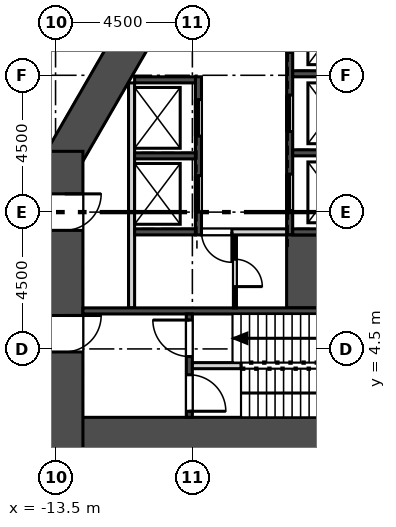
"""IFC4 building model, lengths in metres.
Left out: names, types, materials, properties, quantities, classifications, styles, units other than length and angle.
Written with IfcOpenShell. Run it as: python <this file> out.ifc"""

import sys

from ifc_helpers import new_model, si_unit, direction, frame, frame_2d, origin, place, context, subcontext, project, spatial, rectangle, extrude, element, fill, save


model = new_model("IFC4")
c1 = context("Model", 3, precision=1e-05, world=origin(), true_north=direction((0.0, 1.0)))
c2 = subcontext(c1, "Body", "Model", "MODEL_VIEW")
j1 = project(units=[si_unit("LENGTHUNIT", "METRE"), si_unit("PLANEANGLEUNIT", "RADIAN")], contexts=[c1])
p1 = place(None, origin())
s1 = spatial("IfcSite", under=j1, at=p1, CompositionType="ELEMENT")
p2 = place(p1, origin())
s2 = spatial("IfcBuilding", under=s1, at=p2, CompositionType="ELEMENT")
p3 = place(p2, frame((0.0, 0.0, 132.1)))
s3 = spatial("IfcBuildingStorey", under=s2, at=p3, CompositionType="ELEMENT", Elevation=132.1)
p4 = place(p3, frame((-13.8, 1.65, 0.0), z_axis=(0.0, 0.0, 1.0), x_axis=(1.0, 0.0, 0.0)))
e1 = element("IfcWall", 1, at=p4, inside=s3, PredefinedType="SHEAR", context=c2, shape_type="SweptSolid", body=[
    extrude(rectangle(XDim=27.6, YDim=1.2, at=frame_2d((13.8, 0.0))), origin(), (0.0, 0.0, 1.0), 5.4),
])
p5 = place(p3, frame((-8.777, 18.5, 0.0), z_axis=(0.0, 0.0, 1.0), x_axis=(-0.499998513025, -0.866026262288, 0.0)))
e2 = element("IfcWall", 2, at=p5, inside=s3, PredefinedType="SHEAR", context=c2, shape_type="SweptSolid", body=[
    extrude(rectangle(XDim=9.008, YDim=1.2, at=frame_2d((4.504, 0.0))), origin(), (0.0, 0.0, 1.0), 5.4),
])
p6 = place(p3, frame((-13.2, 10.999, 0.0), z_axis=(0.0, 0.0, 1.0), x_axis=(0.0, -1.0, 0.0)))
e3 = element("IfcWall", 3, at=p6, inside=s3, PredefinedType="SHEAR", context=c2, shape_type="SweptSolid", body=[
    extrude(rectangle(XDim=9.949, YDim=1.2, at=frame_2d((4.975, 0.0))), origin(), (0.0, 0.0, 1.0), 5.4),
])
p7 = place(p6, frame((5.399, 0.0, 0.0)))
e4 = element("IfcOpeningElement", 4, at=p7, cuts=e3, PredefinedType="OPENING", context=c2, shape_type="SweptSolid", body=[
    extrude(rectangle(XDim=1.2, YDim=2.1, at=frame_2d((0.6, 1.05))), frame((0.0, 0.61, 0.0), z_axis=(0.0, -1.0, 0.0), x_axis=(1.0, 0.0, 0.0)), (0.0, 0.0, 1.0), 1.22),
])
p8 = place(p6, frame((1.399, 0.0, 0.0)))
e5 = element("IfcOpeningElement", 5, at=p8, cuts=e3, PredefinedType="OPENING", context=c2, shape_type="SweptSolid", body=[
    extrude(rectangle(XDim=1.2, YDim=2.1, at=frame_2d((0.6, 1.05))), frame((0.0, 0.61, 0.0), z_axis=(0.0, -1.0, 0.0), x_axis=(1.0, 0.0, 0.0)), (0.0, 0.0, 1.0), 1.22),
])
p9 = place(p3, frame((-4.353, 51.692, 0.0), z_axis=(0.0, 0.0, 1.0), x_axis=(-0.500000700546, -0.866024999324, 0.0)))
e6 = element("IfcWall", 6, at=p9, inside=s3, PredefinedType="SOLIDWALL", context=c2, shape_type="SweptSolid", body=[
    extrude(rectangle(XDim=50.787, YDim=0.34, at=frame_2d((25.393, 0.0))), origin(), (0.0, 0.0, 1.0), 5.0),
])
p10 = place(p9, frame((3.59, 0.0, 0.9)))
e7 = element("IfcOpeningElement", 7, at=p10, cuts=e6, PredefinedType="OPENING", context=c2, shape_type="SweptSolid", body=[
    extrude(rectangle(XDim=1.885, YDim=3.0, at=frame_2d((0.942, 1.5))), frame((0.0, 0.18, 0.0), z_axis=(0.0, -1.0, 0.0), x_axis=(1.0, 0.0, 0.0)), (0.0, 0.0, 1.0), 0.36),
])
p11 = place(p9, frame((6.59, 0.0, 0.9)))
e8 = element("IfcOpeningElement", 8, at=p11, cuts=e6, PredefinedType="OPENING", context=c2, shape_type="SweptSolid", body=[
    extrude(rectangle(XDim=1.885, YDim=3.0, at=frame_2d((0.942, 1.5))), frame((0.0, 0.18, 0.0), z_axis=(0.0, -1.0, 0.0), x_axis=(1.0, 0.0, 0.0)), (0.0, 0.0, 1.0), 0.36),
])
p12 = place(p9, frame((9.59, 0.0, 0.9)))
e9 = element("IfcOpeningElement", 9, at=p12, cuts=e6, PredefinedType="OPENING", context=c2, shape_type="SweptSolid", body=[
    extrude(rectangle(XDim=1.885, YDim=3.0, at=frame_2d((0.942, 1.5))), frame((0.0, 0.18, 0.0), z_axis=(0.0, -1.0, 0.0), x_axis=(1.0, 0.0, 0.0)), (0.0, 0.0, 1.0), 0.36),
])
p13 = place(p9, frame((12.59, 0.0, 0.9)))
e10 = element("IfcOpeningElement", 10, at=p13, cuts=e6, PredefinedType="OPENING", context=c2, shape_type="SweptSolid", body=[
    extrude(rectangle(XDim=1.885, YDim=3.0, at=frame_2d((0.942, 1.5))), frame((0.0, 0.18, 0.0), z_axis=(0.0, -1.0, 0.0), x_axis=(1.0, 0.0, 0.0)), (0.0, 0.0, 1.0), 0.36),
])
p14 = place(p9, frame((15.59, 0.0, 0.9)))
e11 = element("IfcOpeningElement", 11, at=p14, cuts=e6, PredefinedType="OPENING", context=c2, shape_type="SweptSolid", body=[
    extrude(rectangle(XDim=1.885, YDim=3.0, at=frame_2d((0.942, 1.5))), frame((0.0, 0.18, 0.0), z_axis=(0.0, -1.0, 0.0), x_axis=(1.0, 0.0, 0.0)), (0.0, 0.0, 1.0), 0.36),
])
p15 = place(p9, frame((18.59, 0.0, 0.9)))
e12 = element("IfcOpeningElement", 12, at=p15, cuts=e6, PredefinedType="OPENING", context=c2, shape_type="SweptSolid", body=[
    extrude(rectangle(XDim=1.885, YDim=3.0, at=frame_2d((0.942, 1.5))), frame((0.0, 0.18, 0.0), z_axis=(0.0, -1.0, 0.0), x_axis=(1.0, 0.0, 0.0)), (0.0, 0.0, 1.0), 0.36),
])
p16 = place(p9, frame((21.59, 0.0, 0.9)))
e13 = element("IfcOpeningElement", 13, at=p16, cuts=e6, PredefinedType="OPENING", context=c2, shape_type="SweptSolid", body=[
    extrude(rectangle(XDim=1.885, YDim=3.0, at=frame_2d((0.942, 1.5))), frame((0.0, 0.18, 0.0), z_axis=(0.0, -1.0, 0.0), x_axis=(1.0, 0.0, 0.0)), (0.0, 0.0, 1.0), 0.36),
])
p17 = place(p9, frame((24.59, 0.0, 0.9)))
e14 = element("IfcOpeningElement", 14, at=p17, cuts=e6, PredefinedType="OPENING", context=c2, shape_type="SweptSolid", body=[
    extrude(rectangle(XDim=1.885, YDim=3.0, at=frame_2d((0.942, 1.5))), frame((0.0, 0.18, 0.0), z_axis=(0.0, -1.0, 0.0), x_axis=(1.0, 0.0, 0.0)), (0.0, 0.0, 1.0), 0.36),
])
p18 = place(p9, frame((27.59, 0.0, 0.9)))
e15 = element("IfcOpeningElement", 15, at=p18, cuts=e6, PredefinedType="OPENING", context=c2, shape_type="SweptSolid", body=[
    extrude(rectangle(XDim=1.885, YDim=3.0, at=frame_2d((0.942, 1.5))), frame((0.0, 0.18, 0.0), z_axis=(0.0, -1.0, 0.0), x_axis=(1.0, 0.0, 0.0)), (0.0, 0.0, 1.0), 0.36),
])
p19 = place(p9, frame((30.59, 0.0, 0.9)))
e16 = element("IfcOpeningElement", 16, at=p19, cuts=e6, PredefinedType="OPENING", context=c2, shape_type="SweptSolid", body=[
    extrude(rectangle(XDim=1.885, YDim=3.0, at=frame_2d((0.942, 1.5))), frame((0.0, 0.18, 0.0), z_axis=(0.0, -1.0, 0.0), x_axis=(1.0, 0.0, 0.0)), (0.0, 0.0, 1.0), 0.36),
])
p20 = place(p9, frame((33.59, 0.0, 0.9)))
e17 = element("IfcOpeningElement", 17, at=p20, cuts=e6, PredefinedType="OPENING", context=c2, shape_type="SweptSolid", body=[
    extrude(rectangle(XDim=1.885, YDim=3.0, at=frame_2d((0.942, 1.5))), frame((0.0, 0.18, 0.0), z_axis=(0.0, -1.0, 0.0), x_axis=(1.0, 0.0, 0.0)), (0.0, 0.0, 1.0), 0.36),
])
p21 = place(p9, frame((36.59, 0.0, 0.9)))
e18 = element("IfcOpeningElement", 18, at=p21, cuts=e6, PredefinedType="OPENING", context=c2, shape_type="SweptSolid", body=[
    extrude(rectangle(XDim=1.885, YDim=3.0, at=frame_2d((0.942, 1.5))), frame((0.0, 0.18, 0.0), z_axis=(0.0, -1.0, 0.0), x_axis=(1.0, 0.0, 0.0)), (0.0, 0.0, 1.0), 0.36),
])
p22 = place(p9, frame((39.59, 0.0, 0.9)))
e19 = element("IfcOpeningElement", 19, at=p22, cuts=e6, PredefinedType="OPENING", context=c2, shape_type="SweptSolid", body=[
    extrude(rectangle(XDim=1.885, YDim=3.0, at=frame_2d((0.942, 1.5))), frame((0.0, 0.18, 0.0), z_axis=(0.0, -1.0, 0.0), x_axis=(1.0, 0.0, 0.0)), (0.0, 0.0, 1.0), 0.36),
])
p23 = place(p9, frame((42.59, 0.0, 0.9)))
e20 = element("IfcOpeningElement", 20, at=p23, cuts=e6, PredefinedType="OPENING", context=c2, shape_type="SweptSolid", body=[
    extrude(rectangle(XDim=1.885, YDim=3.0, at=frame_2d((0.942, 1.5))), frame((0.0, 0.18, 0.0), z_axis=(0.0, -1.0, 0.0), x_axis=(1.0, 0.0, 0.0)), (0.0, 0.0, 1.0), 0.36),
])
p24 = place(p9, frame((45.59, 0.0, 0.9)))
e21 = element("IfcOpeningElement", 21, at=p24, cuts=e6, PredefinedType="OPENING", context=c2, shape_type="SweptSolid", body=[
    extrude(rectangle(XDim=1.885, YDim=3.0, at=frame_2d((0.942, 1.5))), frame((0.0, 0.18, 0.0), z_axis=(0.0, -1.0, 0.0), x_axis=(1.0, 0.0, 0.0)), (0.0, 0.0, 1.0), 0.36),
])
p25 = place(p3, frame((-11.0, 5.85, 0.0), z_axis=(0.0, 0.0, 1.0), x_axis=(0.0, 1.0, 0.0)))
e22 = element("IfcWall", 22, at=p25, inside=s3, PredefinedType="SOLIDWALL", context=c2, shape_type="SweptSolid", body=[
    extrude(rectangle(XDim=7.4, YDim=0.2, at=frame_2d((3.7, 0.0))), origin(), (0.0, 0.0, 1.0), 5.0),
])
p26 = place(p3, frame((-8.8, 8.25, -0.4), z_axis=(0.0, 0.0, 1.0), x_axis=(0.0, 1.0, 0.0)))
e23 = element("IfcWall", 23, at=p26, inside=s3, PredefinedType="SOLIDWALL", context=c2, shape_type="SweptSolid", body=[
    extrude(rectangle(XDim=5.2, YDim=0.2, at=frame_2d((2.6, 0.0))), origin(), (0.0, 0.0, 1.0), 5.4),
])
p27 = place(p26, frame((0.75, 0.0, 0.4)))
e24 = element("IfcOpeningElement", 24, at=p27, cuts=e23, PredefinedType="OPENING", context=c2, shape_type="SweptSolid", body=[
    extrude(rectangle(XDim=1.2, YDim=2.1, at=frame_2d((0.6, 1.05))), frame((0.0, 0.11, 0.0), z_axis=(0.0, -1.0, 0.0), x_axis=(1.0, 0.0, 0.0)), (0.0, 0.0, 1.0), 0.22),
])
p28 = place(p26, frame((3.25, 0.0, 0.4)))
e25 = element("IfcOpeningElement", 25, at=p28, cuts=e23, PredefinedType="OPENING", context=c2, shape_type="SweptSolid", body=[
    extrude(rectangle(XDim=1.2, YDim=2.1, at=frame_2d((0.6, 1.05))), frame((0.0, 0.11, 0.0), z_axis=(0.0, -1.0, 0.0), x_axis=(1.0, 0.0, 0.0)), (0.0, 0.0, 1.0), 0.22),
])
p29 = place(p3, frame((-5.8, 8.25, -0.4), z_axis=(0.0, 0.0, 1.0), x_axis=(0.0, 1.0, 0.0)))
e26 = element("IfcWall", 26, at=p29, inside=s3, PredefinedType="SOLIDWALL", context=c2, shape_type="SweptSolid", body=[
    extrude(rectangle(XDim=8.0, YDim=0.2, at=frame_2d((4.0, 0.0))), origin(), (0.0, 0.0, 1.0), 5.4),
])
p30 = place(p29, frame((0.8, 0.0, 0.4)))
e27 = element("IfcOpeningElement", 27, at=p30, cuts=e26, PredefinedType="OPENING", context=c2, shape_type="SweptSolid", body=[
    extrude(rectangle(XDim=1.2, YDim=2.1, at=frame_2d((0.6, 1.05))), frame((0.0, 0.11, 0.0), z_axis=(0.0, -1.0, 0.0), x_axis=(1.0, 0.0, 0.0)), (0.0, 0.0, 1.0), 0.22),
])
p31 = place(p29, frame((3.4, 0.0, 0.4)))
e28 = element("IfcOpeningElement", 28, at=p31, cuts=e26, PredefinedType="OPENING", context=c2, shape_type="SweptSolid", body=[
    extrude(rectangle(XDim=1.2, YDim=2.1, at=frame_2d((0.6, 1.05))), frame((0.0, 0.11, 0.0), z_axis=(0.0, -1.0, 0.0), x_axis=(1.0, 0.0, 0.0)), (0.0, 0.0, 1.0), 0.22),
])
p32 = place(p29, frame((6.0, 0.0, 0.4)))
e29 = element("IfcOpeningElement", 29, at=p32, cuts=e26, PredefinedType="OPENING", context=c2, shape_type="SweptSolid", body=[
    extrude(rectangle(XDim=1.2, YDim=2.1, at=frame_2d((0.6, 1.05))), frame((0.0, 0.11, 0.0), z_axis=(0.0, -1.0, 0.0), x_axis=(1.0, 0.0, 0.0)), (0.0, 0.0, 1.0), 0.22),
])
p33 = place(p3, frame((-5.2, 5.85, -0.4), z_axis=(0.0, 0.0, 1.0), x_axis=(0.0, 1.0, 0.0)))
e30 = element("IfcWall", 30, at=p33, inside=s3, PredefinedType="SOLIDWALL", context=c2, shape_type="SweptSolid", body=[
    extrude(rectangle(XDim=2.4, YDim=1.4, at=frame_2d((1.2, 0.0))), origin(), (0.0, 0.0, 1.0), 5.4),
])
p34 = place(p3, frame((-10.9, 8.35, -0.4), z_axis=(0.0, 0.0, 1.0), x_axis=(1.0, 0.0, 0.0)))
e31 = element("IfcWall", 31, at=p34, inside=s3, PredefinedType="SOLIDWALL", context=c2, shape_type="SweptSolid", body=[
    extrude(rectangle(XDim=2.0, YDim=0.2, at=frame_2d((1.0, 0.0))), origin(), (0.0, 0.0, 1.0), 5.4),
])
p35 = place(p3, frame((-5.7, 8.35, -0.4), z_axis=(0.0, 0.0, 1.0), x_axis=(1.0, 0.0, 0.0)))
e32 = element("IfcWall", 32, at=p35, inside=s3, PredefinedType="SOLIDWALL", context=c2, shape_type="SweptSolid", body=[
    extrude(rectangle(XDim=4.2, YDim=0.2, at=frame_2d((2.1, 0.0))), origin(), (0.0, 0.0, 1.0), 5.4),
])
p36 = place(p3, frame((-12.6, 5.75, -0.4), z_axis=(0.0, 0.0, 1.0), x_axis=(1.0, 0.0, 0.0)))
e33 = element("IfcWall", 33, at=p36, inside=s3, PredefinedType="SOLIDWALL", context=c2, shape_type="SweptSolid", body=[
    extrude(rectangle(XDim=11.4, YDim=0.2, at=frame_2d((5.7, 0.0))), origin(), (0.0, 0.0, 1.0), 5.4),
])
p37 = place(p3, frame((-9.1, 2.25, -0.4), z_axis=(0.0, 0.0, 1.0), x_axis=(0.0, 1.0, 0.0)))
e34 = element("IfcWall", 34, at=p37, inside=s3, PredefinedType="SOLIDWALL", context=c2, shape_type="SweptSolid", body=[
    extrude(rectangle(XDim=3.4, YDim=0.2, at=frame_2d((1.7, 0.0))), origin(), (0.0, 0.0, 1.0), 5.4),
])
p38 = place(p37, frame((0.2, 0.0, 0.4)))
e35 = element("IfcOpeningElement", 35, at=p38, cuts=e34, PredefinedType="OPENING", context=c2, shape_type="SweptSolid", body=[
    extrude(rectangle(XDim=1.2, YDim=2.1, at=frame_2d((0.6, 1.05))), frame((0.0, 0.11, 0.0), z_axis=(0.0, -1.0, 0.0), x_axis=(1.0, 0.0, 0.0)), (0.0, 0.0, 1.0), 0.22),
])
p39 = place(p37, frame((2.0, 0.0, 0.4)))
e36 = element("IfcOpeningElement", 36, at=p39, cuts=e34, PredefinedType="OPENING", context=c2, shape_type="SweptSolid", body=[
    extrude(rectangle(XDim=1.2, YDim=2.1, at=frame_2d((0.6, 1.05))), frame((0.0, 0.11, 0.0), z_axis=(0.0, -1.0, 0.0), x_axis=(1.0, 0.0, 0.0)), (0.0, 0.0, 1.0), 0.22),
])
for number, where, z_axis, x_axis in (
    (37, (-10.9, 10.85, -0.4), (0.0, 0.0, 1.0), (1.0, 0.0, 0.0)),
    (38, (-10.9, 13.35, -0.4), (0.0, 0.0, 1.0), (1.0, 0.0, 0.0)),
    (39, (-5.7, 10.95, -0.4), (0.0, 0.0, 1.0), (1.0, 0.0, 0.0)),
    (40, (-5.7, 13.55, -0.4), (0.0, 0.0, 1.0), (1.0, 0.0, 0.0)),
):
    element("IfcWall", number, at=place(p3, frame(where, z_axis=z_axis, x_axis=x_axis)), inside=s3, PredefinedType="SOLIDWALL", context=c2, shape_type="SweptSolid", body=[
        extrude(rectangle(XDim=2.0, YDim=0.2, at=frame_2d((1.0, 0.0))), origin(), (0.0, 0.0, 1.0), 5.4),
    ])
p40 = place(p3, frame((-7.6, 5.85, 0.0), z_axis=(0.0, 0.0, 1.0), x_axis=(0.0, 1.0, 0.0)))
e41 = element("IfcWall", 41, at=p40, inside=s3, PredefinedType="PARTITIONING", context=c2, shape_type="SweptSolid", body=[
    extrude(rectangle(XDim=2.4, YDim=0.1, at=frame_2d((1.2, 0.0))), origin(), (0.0, 0.0, 1.0), 5.0),
])
p41 = place(p40, frame((0.7, 0.0, 0.0)))
e42 = element("IfcOpeningElement", 42, at=p41, cuts=e41, PredefinedType="OPENING", context=c2, shape_type="SweptSolid", body=[
    extrude(rectangle(XDim=0.9, YDim=2.1, at=frame_2d((0.45, 1.05))), frame((0.0, 0.06, 0.0), z_axis=(0.0, -1.0, 0.0), x_axis=(1.0, 0.0, 0.0)), (0.0, 0.0, 1.0), 0.12),
])
p42 = place(p3, frame((-8.7, 8.35, 0.0), z_axis=(0.0, 0.0, 1.0), x_axis=(1.0, 0.0, 0.0)))
e43 = element("IfcWall", 43, at=p42, inside=s3, PredefinedType="SOLIDWALL", context=c2, shape_type="SweptSolid", body=[
    extrude(rectangle(XDim=2.8, YDim=0.2, at=frame_2d((1.4, 0.0))), origin(), (0.0, 0.0, 1.0), 5.0),
])
p43 = place(p42, origin())
e44 = element("IfcOpeningElement", 44, at=p43, cuts=e43, PredefinedType="OPENING", context=c2, shape_type="SweptSolid", body=[
    extrude(rectangle(XDim=1.0, YDim=2.1, at=frame_2d((0.5, 1.05))), frame((0.0, 0.11, 0.0), z_axis=(0.0, -1.0, 0.0), x_axis=(1.0, 0.0, 0.0)), (0.0, 0.0, 1.0), 0.22),
])
p44 = place(p3, frame((-9.0, 3.95, 0.0), z_axis=(0.0, 0.0, 1.0), x_axis=(1.0, 0.0, 0.0)))
e45 = element("IfcWall", 45, at=p44, inside=s3, PredefinedType="SOLIDWALL", context=c2, shape_type="SweptSolid", body=[
    extrude(rectangle(XDim=1.6, YDim=0.2, at=frame_2d((0.8, 0.0))), origin(), (0.0, 0.0, 1.0), 5.0),
])
p45 = place(p3, frame((-17.626, 12.272, 0.0), z_axis=(0.0, 0.0, 1.0), x_axis=(0.500008476462, 0.866020509841, 0.0)))
e46 = element("IfcWall", 46, at=p45, inside=s3, PredefinedType="SOLIDWALL", context=c2, shape_type="SweptSolid", body=[
    extrude(rectangle(XDim=11.896, YDim=0.3, at=frame_2d((5.948, 0.0))), origin(), (0.0, 0.0, 1.0), 5.0),
])
p46 = place(p27, origin())
e47 = element("IfcDoor", 47, at=p46, inside=s3, OperationType="SLIDING_TO_LEFT", PredefinedType="DOOR", context=c2, shape_type="SweptSolid", body=[
    extrude(rectangle(XDim=1.2, YDim=2.1, at=frame_2d((0.6, 1.05))), frame((0.0, 0.025, 0.0), z_axis=(0.0, -1.0, 0.0), x_axis=(1.0, 0.0, 0.0)), (0.0, 0.0, 1.0), 0.05),
])
fill(e24, e47)
p47 = place(p28, origin())
e48 = element("IfcDoor", 48, at=p47, inside=s3, OperationType="SLIDING_TO_LEFT", PredefinedType="DOOR", context=c2, shape_type="SweptSolid", body=[
    extrude(rectangle(XDim=1.2, YDim=2.1, at=frame_2d((0.6, 1.05))), frame((0.0, 0.025, 0.0), z_axis=(0.0, -1.0, 0.0), x_axis=(1.0, 0.0, 0.0)), (0.0, 0.0, 1.0), 0.05),
])
fill(e25, e48)
p48 = place(p30, origin())
e49 = element("IfcDoor", 49, at=p48, inside=s3, OperationType="SLIDING_TO_LEFT", PredefinedType="DOOR", context=c2, shape_type="SweptSolid", body=[
    extrude(rectangle(XDim=1.2, YDim=2.1, at=frame_2d((0.6, 1.05))), frame((0.0, 0.025, 0.0), z_axis=(0.0, -1.0, 0.0), x_axis=(1.0, 0.0, 0.0)), (0.0, 0.0, 1.0), 0.05),
])
fill(e27, e49)
p49 = place(p31, origin())
e50 = element("IfcDoor", 50, at=p49, inside=s3, OperationType="SLIDING_TO_LEFT", PredefinedType="DOOR", context=c2, shape_type="SweptSolid", body=[
    extrude(rectangle(XDim=1.2, YDim=2.1, at=frame_2d((0.6, 1.05))), frame((0.0, 0.025, 0.0), z_axis=(0.0, -1.0, 0.0), x_axis=(1.0, 0.0, 0.0)), (0.0, 0.0, 1.0), 0.05),
])
fill(e28, e50)
p50 = place(p43, frame((1.0, 0.0, 0.0), z_axis=(0.0, 0.0, 1.0), x_axis=(-1.0, 0.0, 0.0)))
e51 = element("IfcDoor", 51, at=p50, inside=s3, OperationType="SINGLE_SWING_LEFT", PredefinedType="DOOR", context=c2, shape_type="SweptSolid", body=[
    extrude(rectangle(XDim=1.0, YDim=2.1, at=frame_2d((0.5, 1.05))), frame((0.0, 0.025, 0.0), z_axis=(0.0, -1.0, 0.0), x_axis=(1.0, 0.0, 0.0)), (0.0, 0.0, 1.0), 0.05),
])
fill(e44, e51)
p51 = place(p41, frame((0.9, 0.0, 0.0), z_axis=(0.0, 0.0, 1.0), x_axis=(-1.0, 0.0, 0.0)))
e52 = element("IfcDoor", 52, at=p51, inside=s3, OperationType="SINGLE_SWING_RIGHT", PredefinedType="DOOR", context=c2, shape_type="SweptSolid", body=[
    extrude(rectangle(XDim=0.9, YDim=2.1, at=frame_2d((0.45, 1.05))), frame((0.0, 0.025, 0.0), z_axis=(0.0, -1.0, 0.0), x_axis=(1.0, 0.0, 0.0)), (0.0, 0.0, 1.0), 0.05),
])
fill(e42, e52)
p52 = place(p7, origin())
e53 = element("IfcDoor", 53, at=p52, inside=s3, OperationType="SINGLE_SWING_LEFT", PredefinedType="DOOR", context=c2, shape_type="SweptSolid", body=[
    extrude(rectangle(XDim=1.2, YDim=2.1, at=frame_2d((0.6, 1.05))), frame((0.0, 0.025, 0.0), z_axis=(0.0, -1.0, 0.0), x_axis=(1.0, 0.0, 0.0)), (0.0, 0.0, 1.0), 0.05),
])
fill(e4, e53)
p53 = place(p38, frame((1.2, 0.0, 0.0), z_axis=(0.0, 0.0, 1.0), x_axis=(-1.0, 0.0, 0.0)))
e54 = element("IfcDoor", 54, at=p53, inside=s3, OperationType="SINGLE_SWING_RIGHT", PredefinedType="DOOR", context=c2, shape_type="SweptSolid", body=[
    extrude(rectangle(XDim=1.2, YDim=2.1, at=frame_2d((0.6, 1.05))), frame((0.0, 0.025, 0.0), z_axis=(0.0, -1.0, 0.0), x_axis=(1.0, 0.0, 0.0)), (0.0, 0.0, 1.0), 0.05),
])
fill(e35, e54)
p54 = place(p8, origin())
e55 = element("IfcDoor", 55, at=p54, inside=s3, OperationType="SINGLE_SWING_LEFT", PredefinedType="DOOR", context=c2, shape_type="SweptSolid", body=[
    extrude(rectangle(XDim=1.2, YDim=2.1, at=frame_2d((0.6, 1.05))), frame((0.0, 0.025, 0.0), z_axis=(0.0, -1.0, 0.0), x_axis=(1.0, 0.0, 0.0)), (0.0, 0.0, 1.0), 0.05),
])
fill(e5, e55)
p55 = place(p39, origin())
e56 = element("IfcDoor", 56, at=p55, inside=s3, OperationType="SINGLE_SWING_RIGHT", PredefinedType="DOOR", context=c2, shape_type="SweptSolid", body=[
    extrude(rectangle(XDim=1.2, YDim=2.1, at=frame_2d((0.6, 1.05))), frame((0.0, 0.025, 0.0), z_axis=(0.0, -1.0, 0.0), x_axis=(1.0, 0.0, 0.0)), (0.0, 0.0, 1.0), 0.05),
])
fill(e36, e56)
save(model, sys.argv[1])
